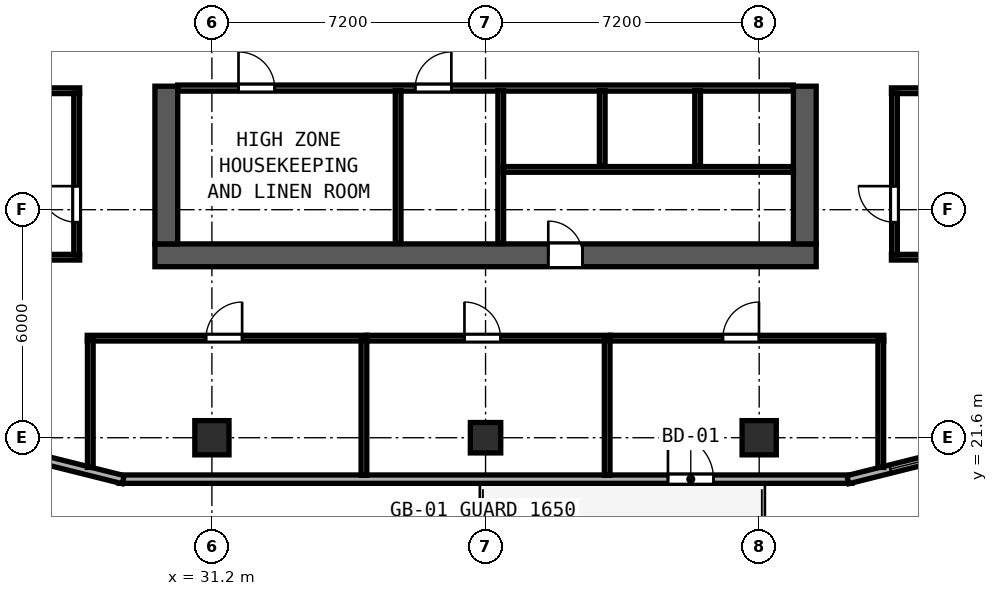
"""IFC4 building model, lengths in metres.
Left out: names, types, materials, properties, quantities, classifications, styles, units other than length and angle.
Written with IfcOpenShell. Run it as: python <this file> out.ifc"""

import sys

from ifc_helpers import new_model, si_unit, direction, frame, frame_2d, origin, origin_2d, place, context, subcontext, project, spatial, rectangle, hollow_rectangle, extrude, element, fill, save


model = new_model("IFC4")
c1 = context("Model", 3, precision=1e-05, world=origin(), true_north=direction((0.0, 1.0)))
c2 = subcontext(c1, "Body", "Model", "MODEL_VIEW")
j1 = project(units=[si_unit("LENGTHUNIT", "METRE"), si_unit("PLANEANGLEUNIT", "RADIAN")], contexts=[c1])
p1 = place(None, origin())
s1 = spatial("IfcSite", under=j1, at=p1, CompositionType="ELEMENT")
p2 = place(p1, origin())
s2 = spatial("IfcBuilding", under=s1, at=p2, CompositionType="ELEMENT")
p3 = place(p2, frame((0.0, 0.0, 223.0)))
s3 = spatial("IfcBuildingStorey", under=s2, at=p3, CompositionType="ELEMENT", Elevation=223.0)
p4 = place(p3, frame((29.7, 26.4, 0.0), z_axis=(0.0, 0.0, 1.0), x_axis=(1.0, 0.0, 0.0)))
e1 = element("IfcWall", 1, at=p4, inside=s3, PredefinedType="SHEAR", context=c2, shape_type="SweptSolid", body=[
    extrude(rectangle(XDim=17.4, YDim=0.6, at=frame_2d((8.7, 0.0))), origin(), (0.0, 0.0, 1.0), 3.62),
])
p5 = place(p4, frame((11.25, 0.0, 0.0), z_axis=(0.0, 0.0, 1.0), x_axis=(-1.0, 0.0, 0.0)))
e2 = element("IfcOpeningElement", 2, at=p5, cuts=e1, PredefinedType="OPENING", context=c2, shape_type="SweptSolid", body=[
    extrude(rectangle(XDim=0.9, YDim=2.1, at=frame_2d((0.45, 1.05))), frame((0.0, 0.31, 0.0), z_axis=(0.0, -1.0, 0.0), x_axis=(1.0, 0.0, 0.0)), (0.0, 0.0, 1.0), 0.62),
])
for number, where, z_axis, x_axis in (
    (3, (30.0, 26.7, 0.0), (0.0, 0.0, 1.0), (0.0, 1.0, 0.0)),
    (4, (46.8, 26.7, 0.0), (0.0, 0.0, 1.0), (0.0, 1.0, 0.0)),
):
    element("IfcWall", number, at=place(p3, frame(where, z_axis=z_axis, x_axis=x_axis)), inside=s3, PredefinedType="SHEAR", context=c2, shape_type="SweptSolid", body=[
        extrude(rectangle(XDim=4.15, YDim=0.6, at=frame_2d((2.075, 0.0))), origin(), (0.0, 0.0, 1.0), 3.62),
    ])
for number, where, z_axis, x_axis in (
    (5, (31.2, 21.6, 0.0), (0.0, 0.0, 1.0), (1.0, 0.0, 0.0)),
    (6, (45.6, 21.6, 0.0), (0.0, 0.0, 1.0), (1.0, 0.0, 0.0)),
):
    element("IfcColumn", number, at=place(p3, frame(where, z_axis=z_axis, x_axis=x_axis)), inside=s3, PredefinedType="COLUMN", context=c2, shape_type="SweptSolid", body=[
        extrude(hollow_rectangle(XDim=0.9, YDim=0.9, WallThickness=0.034, at=origin_2d()), origin(), (0.0, 0.0, 1.0), 3.8),
    ])
p6 = place(p3, frame((38.4, 21.6, 0.0), z_axis=(0.0, 0.0, 1.0), x_axis=(1.0, 0.0, 0.0)))
e7 = element("IfcColumn", 7, at=p6, inside=s3, PredefinedType="COLUMN", context=c2, shape_type="SweptSolid", body=[
    extrude(hollow_rectangle(XDim=0.8, YDim=0.8, WallThickness=0.03, at=origin_2d()), origin(), (0.0, 0.0, 1.0), 3.8),
])
p7 = place(p3, frame((28.759, 20.51, 0.0), z_axis=(0.0, 0.0, 1.0), x_axis=(1.0, 0.0, 0.0)))
e8 = element("IfcWall", 8, at=p7, inside=s3, PredefinedType="SOLIDWALL", context=c2, shape_type="SweptSolid", body=[
    extrude(rectangle(XDim=19.283, YDim=0.22, at=frame_2d((9.642, 0.0))), origin(), (0.0, 0.0, 1.0), 3.62),
])
p8 = place(p7, frame((15.641, 0.0, 0.0), z_axis=(0.0, 0.0, 1.0), x_axis=(-1.0, 0.0, 0.0)))
e9 = element("IfcOpeningElement", 9, at=p8, cuts=e8, PredefinedType="OPENING", context=c2, shape_type="SweptSolid", body=[
    extrude(rectangle(XDim=1.2, YDim=2.15, at=frame_2d((0.6, 1.075))), frame((0.0, 0.12, 0.0), z_axis=(0.0, -1.0, 0.0), x_axis=(1.0, 0.0, 0.0)), (0.0, 0.0, 1.0), 0.24),
])
p9 = place(p3, frame((47.933, 20.497, 0.0), z_axis=(0.0, 0.0, 1.0), x_axis=(0.970142500145, 0.242535625036, 0.0)))
e10 = element("IfcWall", 10, at=p9, inside=s3, PredefinedType="SOLIDWALL", context=c2, shape_type="SweptSolid", body=[
    extrude(rectangle(XDim=4.561, YDim=0.22, at=frame_2d((2.281, 0.0))), origin(), (0.0, 0.0, 1.0), 3.215),
])
p10 = place(p9, frame((1.154, 0.0, 0.85)))
e11 = element("IfcOpeningElement", 11, at=p10, cuts=e10, PredefinedType="OPENING", context=c2, shape_type="SweptSolid", body=[
    extrude(rectangle(XDim=1.1, YDim=1.75, at=frame_2d((0.55, 0.875))), frame((0.0, 0.12, 0.0), z_axis=(0.0, -1.0, 0.0), x_axis=(1.0, 0.0, 0.0)), (0.0, 0.0, 1.0), 0.24),
])
p11 = place(p3, frame((24.442, 21.603, 0.0), z_axis=(0.0, 0.0, 1.0), x_axis=(0.970145648609, -0.242523030833, 0.0)))
e12 = element("IfcWall", 12, at=p11, inside=s3, PredefinedType="SOLIDWALL", context=c2, shape_type="SweptSolid", body=[
    extrude(rectangle(XDim=4.561, YDim=0.22, at=frame_2d((2.281, 0.0))), origin(), (0.0, 0.0, 1.0), 3.215),
])
p12 = place(p11, frame((0.7, 0.0, 0.85)))
e13 = element("IfcOpeningElement", 13, at=p12, cuts=e12, PredefinedType="OPENING", context=c2, shape_type="SweptSolid", body=[
    extrude(rectangle(XDim=1.1, YDim=1.75, at=frame_2d((0.55, 0.875))), frame((0.0, 0.12, 0.0), z_axis=(0.0, -1.0, 0.0), x_axis=(1.0, 0.0, 0.0)), (0.0, 0.0, 1.0), 0.24),
])
p13 = place(p3, frame((30.3, 30.8, 0.0), z_axis=(0.0, 0.0, 1.0), x_axis=(1.0, 0.0, 0.0)))
e14 = element("IfcWall", 14, at=p13, inside=s3, PredefinedType="SOLIDWALL", context=c2, shape_type="SweptSolid", body=[
    extrude(rectangle(XDim=16.2, YDim=0.16, at=frame_2d((8.1, 0.0))), origin(), (0.0, 0.0, 1.0), 3.62),
])
p14 = place(p13, frame((1.6, 0.0, 0.0)))
e15 = element("IfcOpeningElement", 15, at=p14, cuts=e14, PredefinedType="OPENING", context=c2, shape_type="SweptSolid", body=[
    extrude(rectangle(XDim=0.95, YDim=2.12, at=frame_2d((0.475, 1.06))), frame((0.0, 0.09, 0.0), z_axis=(0.0, -1.0, 0.0), x_axis=(1.0, 0.0, 0.0)), (0.0, 0.0, 1.0), 0.18),
])
p15 = place(p13, frame((6.25, 0.0, 0.0)))
e16 = element("IfcOpeningElement", 16, at=p15, cuts=e14, PredefinedType="OPENING", context=c2, shape_type="SweptSolid", body=[
    extrude(rectangle(XDim=0.95, YDim=2.12, at=frame_2d((0.475, 1.06))), frame((0.0, 0.09, 0.0), z_axis=(0.0, -1.0, 0.0), x_axis=(1.0, 0.0, 0.0)), (0.0, 0.0, 1.0), 0.18),
])
p16 = place(p3, frame((38.8, 26.71, 0.0), z_axis=(0.0, 0.0, 1.0), x_axis=(0.0, 1.0, 0.0)))
e17 = element("IfcWall", 17, at=p16, inside=s3, PredefinedType="SOLIDWALL", context=c2, shape_type="SweptSolid", body=[
    extrude(rectangle(XDim=4.025, YDim=0.15, at=frame_2d((2.013, 0.0))), origin(), (0.0, 0.0, 1.0), 3.62),
])
p17 = place(p3, frame((36.1, 26.71, 0.0), z_axis=(0.0, 0.0, 1.0), x_axis=(0.0, 1.0, 0.0)))
e18 = element("IfcWall", 18, at=p17, inside=s3, PredefinedType="PARTITIONING", context=c2, shape_type="SweptSolid", body=[
    extrude(rectangle(XDim=4.025, YDim=0.15, at=frame_2d((2.013, 0.0))), origin(), (0.0, 0.0, 1.0), 3.62),
])
p18 = place(p3, frame((38.86, 28.66, 0.0), z_axis=(0.0, 0.0, 1.0), x_axis=(1.0, 0.0, 0.0)))
e19 = element("IfcWall", 19, at=p18, inside=s3, PredefinedType="PARTITIONING", context=c2, shape_type="SweptSolid", body=[
    extrude(rectangle(XDim=7.64, YDim=0.15, at=frame_2d((3.82, 0.0))), origin(), (0.0, 0.0, 1.0), 3.62),
])
for number, where, z_axis, x_axis in (
    (20, (41.47, 28.75, 0.0), (0.0, 0.0, 1.0), (0.0, 1.0, 0.0)),
    (21, (43.98, 28.75, 0.0), (0.0, 0.0, 1.0), (0.0, 1.0, 0.0)),
):
    element("IfcWall", number, at=place(p3, frame(where, z_axis=z_axis, x_axis=x_axis)), inside=s3, PredefinedType="SOLIDWALL", context=c2, shape_type="SweptSolid", body=[
        extrude(rectangle(XDim=1.985, YDim=0.15, at=frame_2d((0.993, 0.0))), origin(), (0.0, 0.0, 1.0), 3.62),
    ])
for number, where, z_axis, x_axis in (
    (22, (23.92, 30.73, 0.0), (0.0, 0.0, 1.0), (1.0, 0.0, 0.0)),
    (23, (23.92, 26.35, 0.0), (0.0, 0.0, 1.0), (1.0, 0.0, 0.0)),
):
    element("IfcWall", number, at=place(p3, frame(where, z_axis=z_axis, x_axis=x_axis)), inside=s3, PredefinedType="PARTITIONING", context=c2, shape_type="SweptSolid", body=[
        extrude(rectangle(XDim=3.8, YDim=0.15, at=frame_2d((1.9, 0.0))), origin(), (0.0, 0.0, 1.0), 3.62),
    ])
p19 = place(p3, frame((27.64, 26.41, 0.0), z_axis=(0.0, 0.0, 1.0), x_axis=(0.0, 1.0, 0.0)))
e24 = element("IfcWall", 24, at=p19, inside=s3, PredefinedType="PARTITIONING", context=c2, shape_type="SweptSolid", body=[
    extrude(rectangle(XDim=4.26, YDim=0.15, at=frame_2d((2.13, 0.0))), origin(), (0.0, 0.0, 1.0), 3.62),
])
p20 = place(p19, frame((1.81, 0.0, 0.0), z_axis=(0.0, 0.0, 1.0), x_axis=(-1.0, 0.0, 0.0)))
e25 = element("IfcOpeningElement", 25, at=p20, cuts=e24, PredefinedType="OPENING", context=c2, shape_type="SweptSolid", body=[
    extrude(rectangle(XDim=0.95, YDim=2.12, at=frame_2d((0.475, 1.06))), frame((0.0, 0.085, 0.0), z_axis=(0.0, -1.0, 0.0), x_axis=(1.0, 0.0, 0.0)), (0.0, 0.0, 1.0), 0.17),
])
for number, where, z_axis, x_axis in (
    (26, (49.08, 30.73, 0.0), (0.0, 0.0, 1.0), (1.0, 0.0, 0.0)),
    (27, (49.08, 26.35, 0.0), (0.0, 0.0, 1.0), (1.0, 0.0, 0.0)),
):
    element("IfcWall", number, at=place(p3, frame(where, z_axis=z_axis, x_axis=x_axis)), inside=s3, PredefinedType="PARTITIONING", context=c2, shape_type="SweptSolid", body=[
        extrude(rectangle(XDim=3.8, YDim=0.15, at=frame_2d((1.9, 0.0))), origin(), (0.0, 0.0, 1.0), 3.62),
    ])
p21 = place(p3, frame((49.16, 26.41, 0.0), z_axis=(0.0, 0.0, 1.0), x_axis=(0.0, 1.0, 0.0)))
e28 = element("IfcWall", 28, at=p21, inside=s3, PredefinedType="PARTITIONING", context=c2, shape_type="SweptSolid", body=[
    extrude(rectangle(XDim=4.26, YDim=0.15, at=frame_2d((2.13, 0.0))), origin(), (0.0, 0.0, 1.0), 3.62),
])
p22 = place(p21, frame((0.86, 0.0, 0.0)))
e29 = element("IfcOpeningElement", 29, at=p22, cuts=e28, PredefinedType="OPENING", context=c2, shape_type="SweptSolid", body=[
    extrude(rectangle(XDim=0.95, YDim=2.12, at=frame_2d((0.475, 1.06))), frame((0.0, 0.085, 0.0), z_axis=(0.0, -1.0, 0.0), x_axis=(1.0, 0.0, 0.0)), (0.0, 0.0, 1.0), 0.17),
])
p23 = place(p3, frame((27.92, 24.22, 0.0), z_axis=(0.0, 0.0, 1.0), x_axis=(1.0, 0.0, 0.0)))
e30 = element("IfcWall", 30, at=p23, inside=s3, PredefinedType="PARTITIONING", context=c2, shape_type="SweptSolid", body=[
    extrude(rectangle(XDim=7.36, YDim=0.15, at=frame_2d((3.68, 0.0))), origin(), (0.0, 0.0, 1.0), 3.62),
])
p24 = place(p23, frame((4.075, 0.0, 0.0), z_axis=(0.0, 0.0, 1.0), x_axis=(-1.0, 0.0, 0.0)))
e31 = element("IfcOpeningElement", 31, at=p24, cuts=e30, PredefinedType="OPENING", context=c2, shape_type="SweptSolid", body=[
    extrude(rectangle(XDim=0.95, YDim=2.12, at=frame_2d((0.475, 1.06))), frame((0.0, 0.085, 0.0), z_axis=(0.0, -1.0, 0.0), x_axis=(1.0, 0.0, 0.0)), (0.0, 0.0, 1.0), 0.17),
])
p25 = place(p3, frame((28.0, 20.819, 0.0), z_axis=(0.0, 0.0, 1.0), x_axis=(0.0, 1.0, 0.0)))
e32 = element("IfcWall", 32, at=p25, inside=s3, PredefinedType="PARTITIONING", context=c2, shape_type="SweptSolid", body=[
    extrude(rectangle(XDim=3.341, YDim=0.15, at=frame_2d((1.671, 0.0))), origin(), (0.0, 0.0, 1.0), 3.62),
])
p26 = place(p3, frame((35.2, 20.612, 0.0), z_axis=(0.0, 0.0, 1.0), x_axis=(0.0, 1.0, 0.0)))
e33 = element("IfcWall", 33, at=p26, inside=s3, PredefinedType="PARTITIONING", context=c2, shape_type="SweptSolid", body=[
    extrude(rectangle(XDim=3.548, YDim=0.15, at=frame_2d((1.774, 0.0))), origin(), (0.0, 0.0, 1.0), 3.62),
])
p27 = place(p3, frame((35.282, 24.22, 0.0), z_axis=(0.0, 0.0, 1.0), x_axis=(1.0, 0.0, 0.0)))
e34 = element("IfcWall", 34, at=p27, inside=s3, PredefinedType="PARTITIONING", context=c2, shape_type="SweptSolid", body=[
    extrude(rectangle(XDim=6.398, YDim=0.15, at=frame_2d((3.199, 0.0))), origin(), (0.0, 0.0, 1.0), 3.62),
])
p28 = place(p27, frame((3.513, 0.0, 0.0), z_axis=(0.0, 0.0, 1.0), x_axis=(-1.0, 0.0, 0.0)))
e35 = element("IfcOpeningElement", 35, at=p28, cuts=e34, PredefinedType="OPENING", context=c2, shape_type="SweptSolid", body=[
    extrude(rectangle(XDim=0.95, YDim=2.12, at=frame_2d((0.475, 1.06))), frame((0.0, 0.085, 0.0), z_axis=(0.0, -1.0, 0.0), x_axis=(1.0, 0.0, 0.0)), (0.0, 0.0, 1.0), 0.17),
])
p29 = place(p3, frame((41.6, 20.612, 0.0), z_axis=(0.0, 0.0, 1.0), x_axis=(0.0, 1.0, 0.0)))
e36 = element("IfcWall", 36, at=p29, inside=s3, PredefinedType="PARTITIONING", context=c2, shape_type="SweptSolid", body=[
    extrude(rectangle(XDim=3.548, YDim=0.15, at=frame_2d((1.774, 0.0))), origin(), (0.0, 0.0, 1.0), 3.62),
])
p30 = place(p3, frame((41.682, 24.22, 0.0), z_axis=(0.0, 0.0, 1.0), x_axis=(1.0, 0.0, 0.0)))
e37 = element("IfcWall", 37, at=p30, inside=s3, PredefinedType="PARTITIONING", context=c2, shape_type="SweptSolid", body=[
    extrude(rectangle(XDim=7.198, YDim=0.15, at=frame_2d((3.599, 0.0))), origin(), (0.0, 0.0, 1.0), 3.62),
])
p31 = place(p30, frame((3.913, 0.0, 0.0), z_axis=(0.0, 0.0, 1.0), x_axis=(-1.0, 0.0, 0.0)))
e38 = element("IfcOpeningElement", 38, at=p31, cuts=e37, PredefinedType="OPENING", context=c2, shape_type="SweptSolid", body=[
    extrude(rectangle(XDim=0.95, YDim=2.12, at=frame_2d((0.475, 1.06))), frame((0.0, 0.085, 0.0), z_axis=(0.0, -1.0, 0.0), x_axis=(1.0, 0.0, 0.0)), (0.0, 0.0, 1.0), 0.17),
])
p32 = place(p3, frame((48.8, 20.819, 0.0), z_axis=(0.0, 0.0, 1.0), x_axis=(0.0, 1.0, 0.0)))
e39 = element("IfcWall", 39, at=p32, inside=s3, PredefinedType="PARTITIONING", context=c2, shape_type="SweptSolid", body=[
    extrude(rectangle(XDim=3.341, YDim=0.15, at=frame_2d((1.671, 0.0))), origin(), (0.0, 0.0, 1.0), 3.62),
])
p33 = place(p10, origin())
e40 = element("IfcWindow", 40, at=p33, inside=s3, PartitioningType="SINGLE_PANEL", PredefinedType="WINDOW", context=c2, shape_type="SweptSolid", body=[
    extrude(rectangle(XDim=1.1, YDim=1.75, at=frame_2d((0.55, 0.875))), frame((0.0, 0.03, 0.0), z_axis=(0.0, -1.0, 0.0), x_axis=(1.0, 0.0, 0.0)), (0.0, 0.0, 1.0), 0.06),
])
fill(e11, e40)
p34 = place(p8, origin())
e41 = element("IfcDoor", 41, at=p34, inside=s3, OperationType="SINGLE_SWING_RIGHT", PredefinedType="DOOR", context=c2, shape_type="SweptSolid", body=[
    extrude(rectangle(XDim=1.2, YDim=2.15, at=frame_2d((0.6, 1.075))), frame((0.0, 0.025, 0.0), z_axis=(0.0, -1.0, 0.0), x_axis=(1.0, 0.0, 0.0)), (0.0, 0.0, 1.0), 0.05),
])
fill(e9, e41)
p35 = place(p14, origin())
e42 = element("IfcDoor", 42, at=p35, inside=s3, OperationType="SINGLE_SWING_LEFT", PredefinedType="DOOR", context=c2, shape_type="SweptSolid", body=[
    extrude(rectangle(XDim=0.95, YDim=2.12, at=frame_2d((0.475, 1.06))), frame((0.0, 0.025, 0.0), z_axis=(0.0, -1.0, 0.0), x_axis=(1.0, 0.0, 0.0)), (0.0, 0.0, 1.0), 0.05),
])
fill(e15, e42)
p36 = place(p15, origin())
e43 = element("IfcDoor", 43, at=p36, inside=s3, OperationType="SINGLE_SWING_RIGHT", PredefinedType="DOOR", context=c2, shape_type="SweptSolid", body=[
    extrude(rectangle(XDim=0.95, YDim=2.12, at=frame_2d((0.475, 1.06))), frame((0.0, 0.025, 0.0), z_axis=(0.0, -1.0, 0.0), x_axis=(1.0, 0.0, 0.0)), (0.0, 0.0, 1.0), 0.05),
])
fill(e16, e43)
p37 = place(p5, origin())
e44 = element("IfcDoor", 44, at=p37, inside=s3, OperationType="SINGLE_SWING_RIGHT", PredefinedType="DOOR", context=c2, shape_type="SweptSolid", body=[
    extrude(rectangle(XDim=0.9, YDim=2.1, at=frame_2d((0.45, 1.05))), frame((0.0, -0.195, 0.0), z_axis=(0.0, -1.0, 0.0), x_axis=(1.0, 0.0, 0.0)), (0.0, 0.0, 1.0), 0.05),
])
fill(e2, e44)
p38 = place(p20, origin())
e45 = element("IfcDoor", 45, at=p38, inside=s3, OperationType="SINGLE_SWING_LEFT", PredefinedType="DOOR", context=c2, shape_type="SweptSolid", body=[
    extrude(rectangle(XDim=0.95, YDim=2.12, at=frame_2d((0.475, 1.06))), frame((0.0, 0.025, 0.0), z_axis=(0.0, -1.0, 0.0), x_axis=(1.0, 0.0, 0.0)), (0.0, 0.0, 1.0), 0.05),
])
fill(e25, e45)
p39 = place(p22, origin())
e46 = element("IfcDoor", 46, at=p39, inside=s3, OperationType="SINGLE_SWING_RIGHT", PredefinedType="DOOR", context=c2, shape_type="SweptSolid", body=[
    extrude(rectangle(XDim=0.95, YDim=2.12, at=frame_2d((0.475, 1.06))), frame((0.0, 0.025, 0.0), z_axis=(0.0, -1.0, 0.0), x_axis=(1.0, 0.0, 0.0)), (0.0, 0.0, 1.0), 0.05),
])
fill(e29, e46)
p40 = place(p24, origin())
e47 = element("IfcDoor", 47, at=p40, inside=s3, OperationType="SINGLE_SWING_LEFT", PredefinedType="DOOR", context=c2, shape_type="SweptSolid", body=[
    extrude(rectangle(XDim=0.95, YDim=2.12, at=frame_2d((0.475, 1.06))), frame((0.0, 0.025, 0.0), z_axis=(0.0, -1.0, 0.0), x_axis=(1.0, 0.0, 0.0)), (0.0, 0.0, 1.0), 0.05),
])
fill(e31, e47)
p41 = place(p28, origin())
e48 = element("IfcDoor", 48, at=p41, inside=s3, OperationType="SINGLE_SWING_RIGHT", PredefinedType="DOOR", context=c2, shape_type="SweptSolid", body=[
    extrude(rectangle(XDim=0.95, YDim=2.12, at=frame_2d((0.475, 1.06))), frame((0.0, 0.025, 0.0), z_axis=(0.0, -1.0, 0.0), x_axis=(1.0, 0.0, 0.0)), (0.0, 0.0, 1.0), 0.05),
])
fill(e35, e48)
p42 = place(p31, origin())
e49 = element("IfcDoor", 49, at=p42, inside=s3, OperationType="SINGLE_SWING_LEFT", PredefinedType="DOOR", context=c2, shape_type="SweptSolid", body=[
    extrude(rectangle(XDim=0.95, YDim=2.12, at=frame_2d((0.475, 1.06))), frame((0.0, 0.025, 0.0), z_axis=(0.0, -1.0, 0.0), x_axis=(1.0, 0.0, 0.0)), (0.0, 0.0, 1.0), 0.05),
])
fill(e38, e49)
save(model, sys.argv[1])
